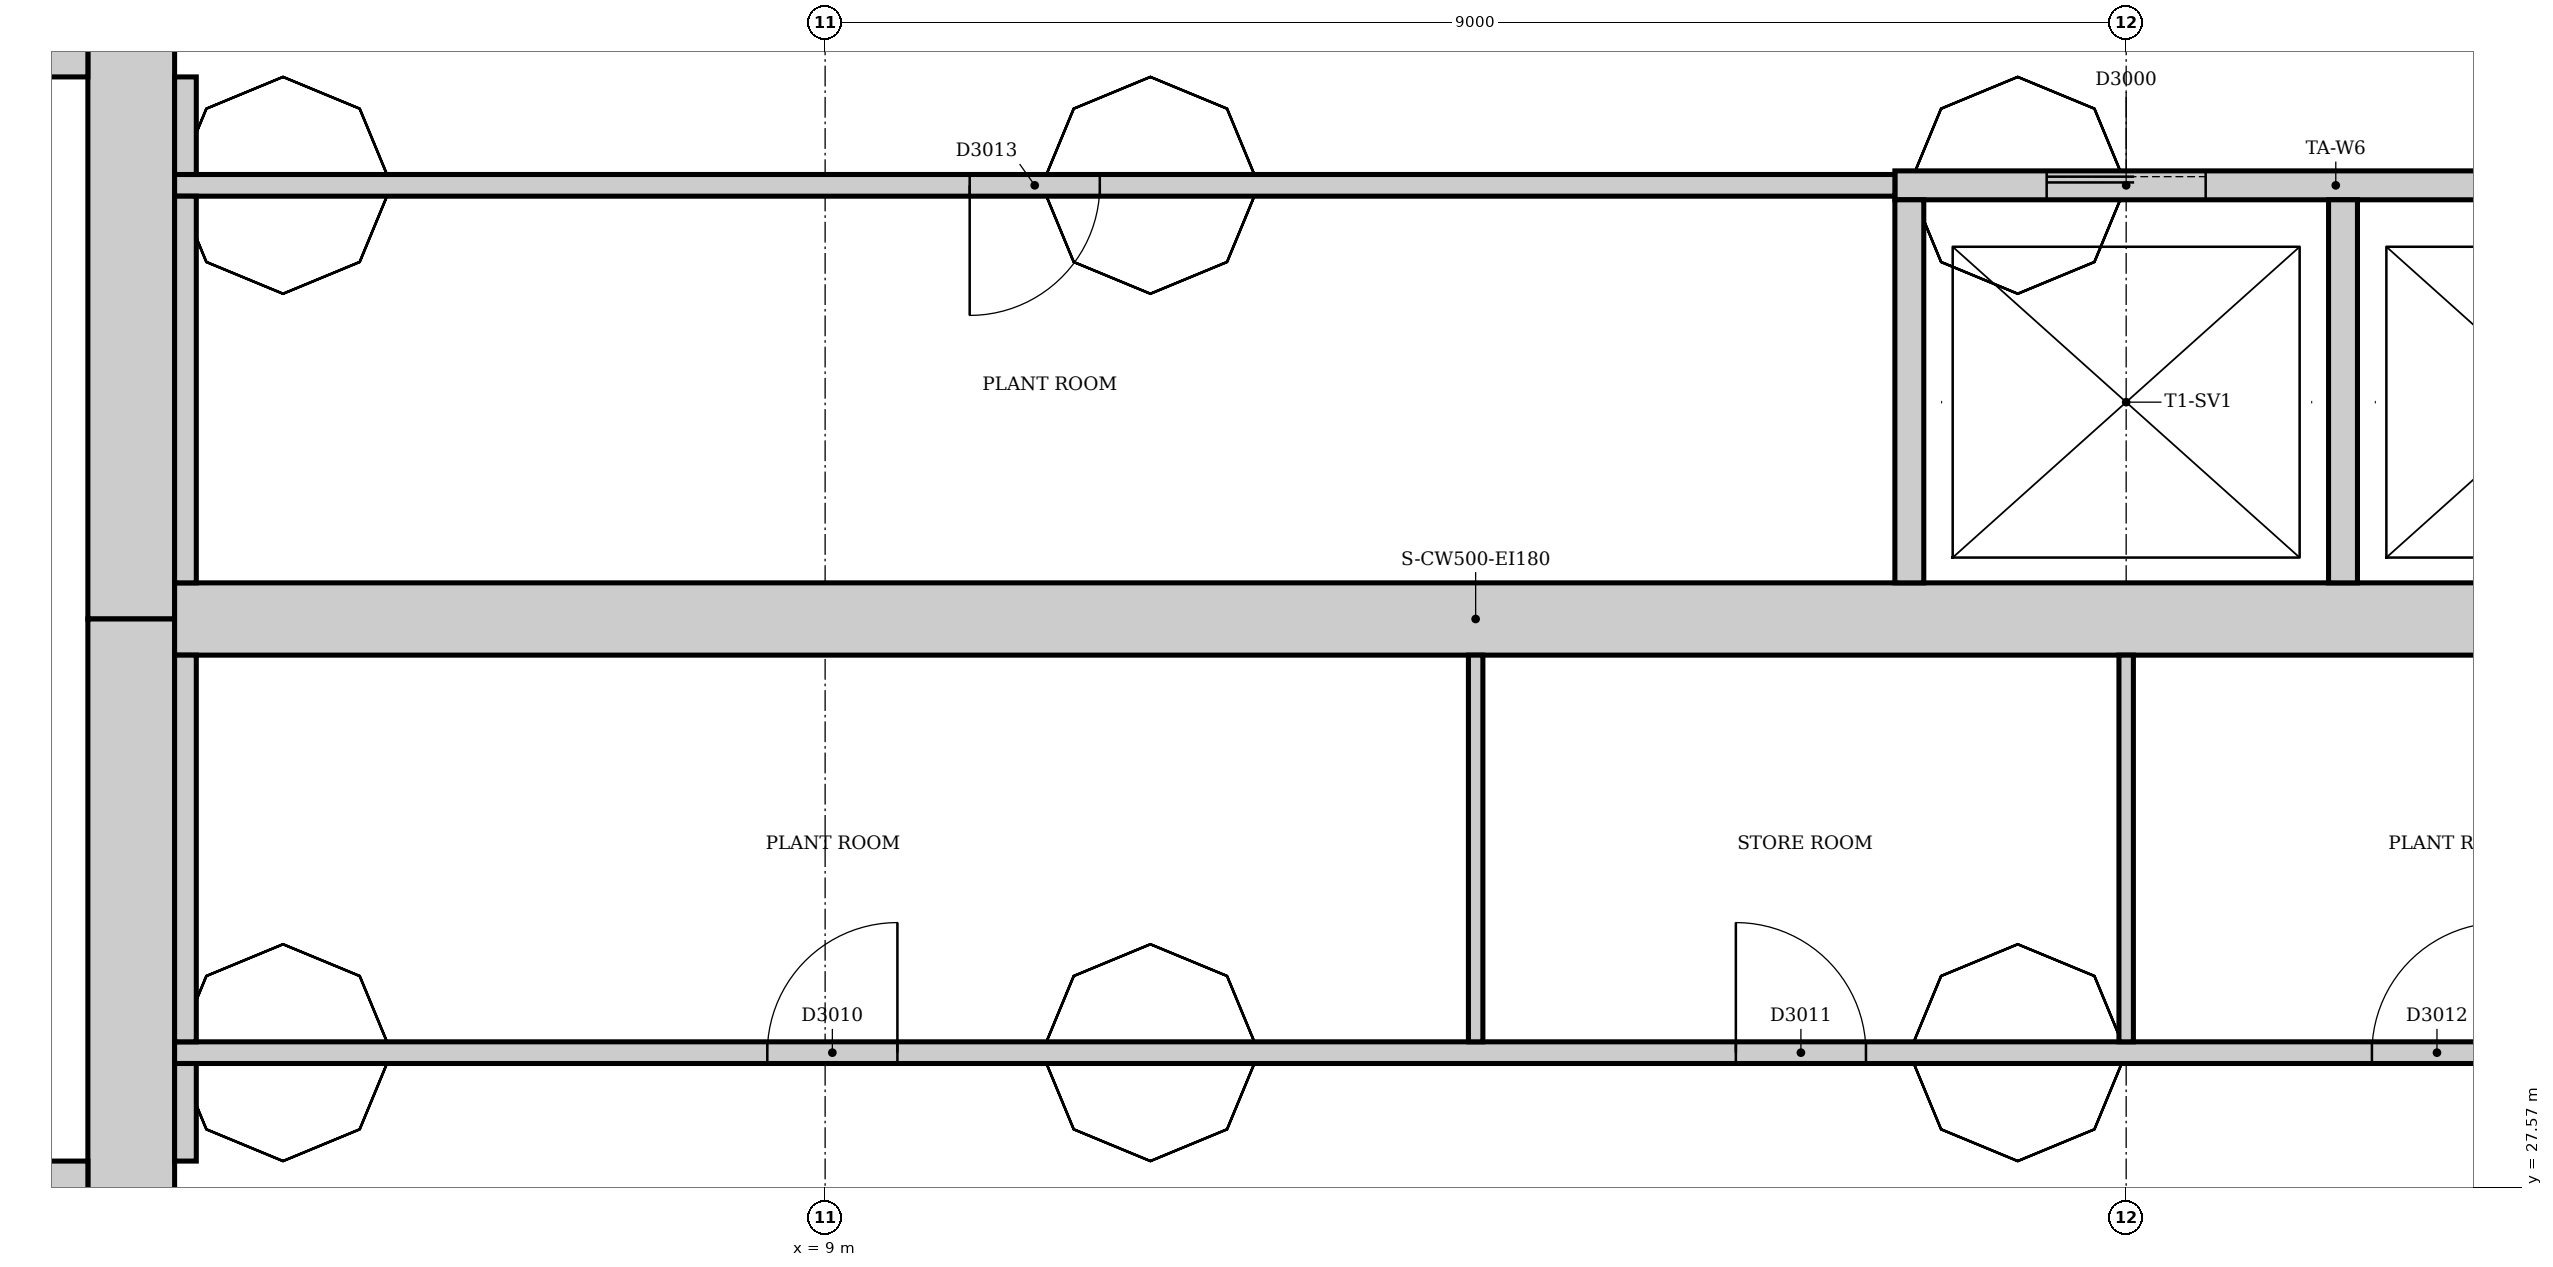
"""IFC4 building model, lengths in metres.
Left out: names, types, materials, properties, quantities, classifications, styles, units other than length and angle.
Written with IfcOpenShell. Run it as: python <this file> out.ifc"""

import sys

from ifc_helpers import new_model, si_unit, direction, frame, frame_2d, origin, place, context, subcontext, project, spatial, rectangle, extrude, element, fill, save


model = new_model("IFC4")
c1 = context("Model", 3, precision=1e-05, world=origin(), true_north=direction((0.0, 1.0)))
c2 = subcontext(c1, "Body", "Model", "MODEL_VIEW")
j1 = project(units=[si_unit("LENGTHUNIT", "METRE"), si_unit("PLANEANGLEUNIT", "RADIAN")], contexts=[c1])
p1 = place(None, origin())
s1 = spatial("IfcSite", under=j1, at=p1, CompositionType="ELEMENT")
p2 = place(p1, origin())
s2 = spatial("IfcBuilding", under=s1, at=p2, CompositionType="ELEMENT")
p3 = place(p2, frame((0.0, 0.0, -14.0)))
s3 = spatial("IfcBuildingStorey", under=s2, at=p3, CompositionType="ELEMENT", Elevation=-14.0)
for number, where, z_axis, x_axis in (
    (1, (4.2, 42.0, 0.0), (0.0, 0.0, 1.0), (0.0, -1.0, 0.0)),
    (2, (4.2, 31.5, 0.0), (0.0, 0.0, 1.0), (0.0, -1.0, 0.0)),
):
    element("IfcWall", number, at=place(p3, frame(where, z_axis=z_axis, x_axis=x_axis)), inside=s3, PredefinedType="SOLIDWALL", context=c2, shape_type="SweptSolid", body=[
        extrude(rectangle(XDim=10.5, YDim=0.6, at=frame_2d((5.25, 0.0))), origin(), (0.0, 0.0, 1.0), 4.5),
    ])
p4 = place(p3, frame((4.5, 31.5, 0.0), z_axis=(0.0, 0.0, 1.0), x_axis=(1.0, 0.0, 0.0)))
e3 = element("IfcWall", 3, at=p4, inside=s3, PredefinedType="SOLIDWALL", context=c2, shape_type="SweptSolid", body=[
    extrude(rectangle(XDim=18.0, YDim=0.5, at=frame_2d((9.0, 0.0))), origin(), (0.0, 0.0, 1.0), 4.5),
])
for number, where, z_axis, x_axis in (
    (4, (3.9, 27.625, 0.0), (0.0, 0.0, 1.0), (-1.0, 0.0, 0.0)),
    (5, (0.36, 35.375, 0.0), (0.0, 0.0, 1.0), (1.0, 0.0, 0.0)),
):
    element("IfcWall", number, at=place(p3, frame(where, z_axis=z_axis, x_axis=x_axis)), inside=s3, PredefinedType="SOLIDWALL", context=c2, shape_type="SweptSolid", body=[
        extrude(rectangle(XDim=3.54, YDim=0.25, at=frame_2d((1.77, 0.0))), origin(), (0.0, 0.0, 1.0), 4.5),
    ])
p5 = place(p3, frame((16.4, 34.5, 0.0), z_axis=(0.0, 0.0, 1.0), x_axis=(1.0, 0.0, 0.0)))
e6 = element("IfcWall", 6, at=p5, inside=s3, PredefinedType="PARTITIONING", context=c2, shape_type="SweptSolid", body=[
    extrude(rectangle(XDim=6.1, YDim=0.2, at=frame_2d((3.05, 0.0))), origin(), (0.0, 0.0, 1.0), 4.15),
])
p6 = place(p5, frame((1.05, 0.0, 0.0)))
e7 = element("IfcOpeningElement", 7, at=p6, cuts=e6, PredefinedType="OPENING", context=c2, shape_type="SweptSolid", body=[
    extrude(rectangle(XDim=1.1, YDim=2.1, at=frame_2d((0.55, 1.05))), frame((0.0, 0.11, 0.0), z_axis=(0.0, -1.0, 0.0), x_axis=(1.0, 0.0, 0.0)), (0.0, 0.0, 1.0), 0.22),
])
p7 = place(p5, frame((4.05, 0.0, 0.0)))
e8 = element("IfcOpeningElement", 8, at=p7, cuts=e6, PredefinedType="OPENING", context=c2, shape_type="SweptSolid", body=[
    extrude(rectangle(XDim=1.1, YDim=2.1, at=frame_2d((0.55, 1.05))), frame((0.0, 0.11, 0.0), z_axis=(0.0, -1.0, 0.0), x_axis=(1.0, 0.0, 0.0)), (0.0, 0.0, 1.0), 0.22),
])
for number, where, z_axis, x_axis in (
    (9, (16.5, 31.75, 0.0), (0.0, 0.0, 1.0), (0.0, 1.0, 0.0)),
    (10, (19.5, 31.75, 0.0), (0.0, 0.0, 1.0), (0.0, 1.0, 0.0)),
):
    element("IfcWall", number, at=place(p3, frame(where, z_axis=z_axis, x_axis=x_axis)), inside=s3, PredefinedType="PARTITIONING", context=c2, shape_type="SweptSolid", body=[
        extrude(rectangle(XDim=2.65, YDim=0.2, at=frame_2d((1.325, 0.0))), origin(), (0.0, 0.0, 1.0), 4.15),
    ])
p8 = place(p3, frame((4.5, 28.5, 0.0), z_axis=(0.0, 0.0, 1.0), x_axis=(1.0, 0.0, 0.0)))
e11 = element("IfcWall", 11, at=p8, inside=s3, PredefinedType="PARTITIONING", context=c2, shape_type="SweptSolid", body=[
    extrude(rectangle(XDim=18.0, YDim=0.15, at=frame_2d((9.0, 0.0))), origin(), (0.0, 0.0, 1.0), 4.15),
])
p9 = place(p8, frame((4.1, 0.0, 0.0)))
e12 = element("IfcOpeningElement", 12, at=p9, cuts=e11, PredefinedType="OPENING", context=c2, shape_type="SweptSolid", body=[
    extrude(rectangle(XDim=0.9, YDim=2.1, at=frame_2d((0.45, 1.05))), frame((0.0, 0.085, 0.0), z_axis=(0.0, -1.0, 0.0), x_axis=(1.0, 0.0, 0.0)), (0.0, 0.0, 1.0), 0.17),
])
p10 = place(p8, frame((10.8, 0.0, 0.0)))
e13 = element("IfcOpeningElement", 13, at=p10, cuts=e11, PredefinedType="OPENING", context=c2, shape_type="SweptSolid", body=[
    extrude(rectangle(XDim=0.9, YDim=2.1, at=frame_2d((0.45, 1.05))), frame((0.0, 0.085, 0.0), z_axis=(0.0, -1.0, 0.0), x_axis=(1.0, 0.0, 0.0)), (0.0, 0.0, 1.0), 0.17),
])
p11 = place(p8, frame((15.2, 0.0, 0.0)))
e14 = element("IfcOpeningElement", 14, at=p11, cuts=e11, PredefinedType="OPENING", context=c2, shape_type="SweptSolid", body=[
    extrude(rectangle(XDim=0.9, YDim=2.1, at=frame_2d((0.45, 1.05))), frame((0.0, 0.085, 0.0), z_axis=(0.0, -1.0, 0.0), x_axis=(1.0, 0.0, 0.0)), (0.0, 0.0, 1.0), 0.17),
])
p12 = place(p3, frame((4.5, 34.5, 0.0), z_axis=(0.0, 0.0, 1.0), x_axis=(1.0, 0.0, 0.0)))
e15 = element("IfcWall", 15, at=p12, inside=s3, PredefinedType="PARTITIONING", context=c2, shape_type="SweptSolid", body=[
    extrude(rectangle(XDim=11.9, YDim=0.15, at=frame_2d((5.95, 0.0))), origin(), (0.0, 0.0, 1.0), 4.15),
])
p13 = place(p12, frame((5.5, 0.0, 0.0)))
e16 = element("IfcOpeningElement", 16, at=p13, cuts=e15, PredefinedType="OPENING", context=c2, shape_type="SweptSolid", body=[
    extrude(rectangle(XDim=0.9, YDim=2.1, at=frame_2d((0.45, 1.05))), frame((0.0, 0.085, 0.0), z_axis=(0.0, -1.0, 0.0), x_axis=(1.0, 0.0, 0.0)), (0.0, 0.0, 1.0), 0.17),
])
p14 = place(p3, frame((4.575, 34.575, 0.0), z_axis=(0.0, 0.0, 1.0), x_axis=(0.0, 1.0, 0.0)))
e17 = element("IfcWall", 17, at=p14, inside=s3, PredefinedType="PARTITIONING", context=c2, shape_type="SweptSolid", body=[
    extrude(rectangle(XDim=0.675, YDim=0.15, at=frame_2d((0.338, 0.0))), origin(), (0.0, 0.0, 1.0), 4.15),
])
p15 = place(p3, frame((4.575, 31.75, 0.0), z_axis=(0.0, 0.0, 1.0), x_axis=(0.0, 1.0, 0.0)))
e18 = element("IfcWall", 18, at=p15, inside=s3, PredefinedType="PARTITIONING", context=c2, shape_type="SweptSolid", body=[
    extrude(rectangle(XDim=2.675, YDim=0.15, at=frame_2d((1.337, 0.0))), origin(), (0.0, 0.0, 1.0), 4.15),
])
p16 = place(p3, frame((4.575, 27.75, 0.0), z_axis=(0.0, 0.0, 1.0), x_axis=(0.0, 1.0, 0.0)))
e19 = element("IfcWall", 19, at=p16, inside=s3, PredefinedType="PARTITIONING", context=c2, shape_type="SweptSolid", body=[
    extrude(rectangle(XDim=0.675, YDim=0.15, at=frame_2d((0.338, 0.0))), origin(), (0.0, 0.0, 1.0), 4.15),
])
p17 = place(p3, frame((4.575, 28.575, 0.0), z_axis=(0.0, 0.0, 1.0), x_axis=(0.0, 1.0, 0.0)))
e20 = element("IfcWall", 20, at=p17, inside=s3, PredefinedType="PARTITIONING", context=c2, shape_type="SweptSolid", body=[
    extrude(rectangle(XDim=2.675, YDim=0.15, at=frame_2d((1.337, 0.0))), origin(), (0.0, 0.0, 1.0), 4.15),
])
for number, where, z_axis, x_axis in (
    (21, (13.5, 28.575, 0.0), (0.0, 0.0, 1.0), (0.0, 1.0, 0.0)),
    (22, (18.0, 28.575, 0.0), (0.0, 0.0, 1.0), (0.0, 1.0, 0.0)),
):
    element("IfcWall", number, at=place(p3, frame(where, z_axis=z_axis, x_axis=x_axis)), inside=s3, PredefinedType="PARTITIONING", context=c2, shape_type="SweptSolid", body=[
        extrude(rectangle(XDim=2.675, YDim=0.1, at=frame_2d((1.337, 0.0))), origin(), (0.0, 0.0, 1.0), 4.15),
    ])
p18 = place(p6, origin())
e23 = element("IfcDoor", 23, at=p18, inside=s3, OperationType="SLIDING_TO_LEFT", PredefinedType="DOOR", context=c2, shape_type="SweptSolid", body=[
    extrude(rectangle(XDim=1.1, YDim=2.1, at=frame_2d((0.55, 1.05))), frame((0.0, 0.025, 0.0), z_axis=(0.0, -1.0, 0.0), x_axis=(1.0, 0.0, 0.0)), (0.0, 0.0, 1.0), 0.05),
])
fill(e7, e23)
p19 = place(p9, origin())
e24 = element("IfcDoor", 24, at=p19, inside=s3, OperationType="SINGLE_SWING_RIGHT", PredefinedType="DOOR", context=c2, shape_type="SweptSolid", body=[
    extrude(rectangle(XDim=0.9, YDim=2.1, at=frame_2d((0.45, 1.05))), frame((0.0, 0.025, 0.0), z_axis=(0.0, -1.0, 0.0), x_axis=(1.0, 0.0, 0.0)), (0.0, 0.0, 1.0), 0.05),
])
fill(e12, e24)
p20 = place(p10, origin())
e25 = element("IfcDoor", 25, at=p20, inside=s3, OperationType="SINGLE_SWING_LEFT", PredefinedType="DOOR", context=c2, shape_type="SweptSolid", body=[
    extrude(rectangle(XDim=0.9, YDim=2.1, at=frame_2d((0.45, 1.05))), frame((0.0, 0.025, 0.0), z_axis=(0.0, -1.0, 0.0), x_axis=(1.0, 0.0, 0.0)), (0.0, 0.0, 1.0), 0.05),
])
fill(e13, e25)
p21 = place(p11, origin())
e26 = element("IfcDoor", 26, at=p21, inside=s3, OperationType="SINGLE_SWING_RIGHT", PredefinedType="DOOR", context=c2, shape_type="SweptSolid", body=[
    extrude(rectangle(XDim=0.9, YDim=2.1, at=frame_2d((0.45, 1.05))), frame((0.0, 0.025, 0.0), z_axis=(0.0, -1.0, 0.0), x_axis=(1.0, 0.0, 0.0)), (0.0, 0.0, 1.0), 0.05),
])
fill(e14, e26)
p22 = place(p13, frame((0.9, 0.0, 0.0), z_axis=(0.0, 0.0, 1.0), x_axis=(-1.0, 0.0, 0.0)))
e27 = element("IfcDoor", 27, at=p22, inside=s3, OperationType="SINGLE_SWING_RIGHT", PredefinedType="DOOR", context=c2, shape_type="SweptSolid", body=[
    extrude(rectangle(XDim=0.9, YDim=2.1, at=frame_2d((0.45, 1.05))), frame((0.0, 0.025, 0.0), z_axis=(0.0, -1.0, 0.0), x_axis=(1.0, 0.0, 0.0)), (0.0, 0.0, 1.0), 0.05),
])
fill(e16, e27)
save(model, sys.argv[1])
